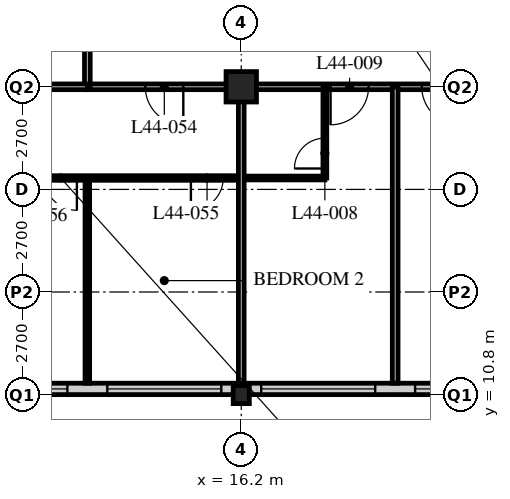
"""IFC4 building model, lengths in metres.
Left out: names, types, materials, properties, quantities, classifications, styles, units other than length and angle.
Written with IfcOpenShell. Run it as: python <this file> out.ifc"""

import sys

from ifc_helpers import new_model, si_unit, direction, frame, frame_2d, origin, origin_2d, place, context, subcontext, project, spatial, rectangle, hollow_rectangle, i_section, extrude, element, fill, save


model = new_model("IFC4")
c1 = context("Model", 3, precision=1e-05, world=origin(), true_north=direction((0.0, 1.0)))
c2 = subcontext(c1, "Body", "Model", "MODEL_VIEW")
j1 = project(units=[si_unit("LENGTHUNIT", "METRE"), si_unit("PLANEANGLEUNIT", "RADIAN")], contexts=[c1])
p1 = place(None, origin())
s1 = spatial("IfcSite", under=j1, at=p1, CompositionType="ELEMENT")
p2 = place(p1, origin())
s2 = spatial("IfcBuilding", under=s1, at=p2, CompositionType="ELEMENT")
p3 = place(p2, frame((0.0, 0.0, 174.0)))
s3 = spatial("IfcBuildingStorey", under=s2, at=p3, CompositionType="ELEMENT", Elevation=174.0)
p4 = place(p3, frame((16.2, 10.8, 0.0), z_axis=(0.0, 0.0, 1.0), x_axis=(1.0, 0.0, 0.0)))
e1 = element("IfcColumn", 1, at=p4, inside=s3, PredefinedType="COLUMN", context=c2, shape_type="SweptSolid", body=[
    extrude(i_section(OverallWidth=0.424, OverallDepth=0.475, WebThickness=0.048, FlangeThickness=0.077, FilletRadius=0.015, at=origin_2d()), origin(), (0.0, 0.0, 1.0), 3.6),
])
p5 = place(p3, frame((16.2, 18.9, 0.0), z_axis=(0.0, 0.0, 1.0), x_axis=(1.0, 0.0, 0.0)))
e2 = element("IfcColumn", 2, at=p5, inside=s3, PredefinedType="COLUMN", context=c2, shape_type="SweptSolid", body=[
    extrude(hollow_rectangle(XDim=0.8, YDim=0.8, WallThickness=0.08, at=origin_2d()), origin(), (0.0, 0.0, 1.0), 3.6),
])
p6 = place(p3, frame((8.4, 10.95, 0.0), z_axis=(0.0, 0.0, 1.0), x_axis=(1.0, 0.0, 0.0)))
e3 = element("IfcWall", 3, at=p6, inside=s3, PredefinedType="SOLIDWALL", context=c2, shape_type="SweptSolid", body=[
    extrude(rectangle(XDim=40.2, YDim=0.3, at=frame_2d((20.1, 0.0))), origin(), (0.0, 0.0, 1.0), 3.39),
])
p7 = place(p6, frame((0.225, 0.0, 0.6)))
e4 = element("IfcOpeningElement", 4, at=p7, cuts=e3, PredefinedType="OPENING", context=c2, shape_type="SweptSolid", body=[
    extrude(rectangle(XDim=3.0, YDim=2.4, at=frame_2d((1.5, 1.2))), frame((0.0, 0.16, 0.0), z_axis=(0.0, -1.0, 0.0), x_axis=(1.0, 0.0, 0.0)), (0.0, 0.0, 1.0), 0.32),
])
p8 = place(p6, frame((4.275, 0.0, 0.6)))
e5 = element("IfcOpeningElement", 5, at=p8, cuts=e3, PredefinedType="OPENING", context=c2, shape_type="SweptSolid", body=[
    extrude(rectangle(XDim=3.0, YDim=2.4, at=frame_2d((1.5, 1.2))), frame((0.0, 0.16, 0.0), z_axis=(0.0, -1.0, 0.0), x_axis=(1.0, 0.0, 0.0)), (0.0, 0.0, 1.0), 0.32),
])
p9 = place(p6, frame((8.325, 0.0, 0.6)))
e6 = element("IfcOpeningElement", 6, at=p9, cuts=e3, PredefinedType="OPENING", context=c2, shape_type="SweptSolid", body=[
    extrude(rectangle(XDim=3.0, YDim=2.4, at=frame_2d((1.5, 1.2))), frame((0.0, 0.16, 0.0), z_axis=(0.0, -1.0, 0.0), x_axis=(1.0, 0.0, 0.0)), (0.0, 0.0, 1.0), 0.32),
])
p10 = place(p6, frame((12.375, 0.0, 0.6)))
e7 = element("IfcOpeningElement", 7, at=p10, cuts=e3, PredefinedType="OPENING", context=c2, shape_type="SweptSolid", body=[
    extrude(rectangle(XDim=3.0, YDim=2.4, at=frame_2d((1.5, 1.2))), frame((0.0, 0.16, 0.0), z_axis=(0.0, -1.0, 0.0), x_axis=(1.0, 0.0, 0.0)), (0.0, 0.0, 1.0), 0.32),
])
p11 = place(p6, frame((16.425, 0.0, 0.6)))
e8 = element("IfcOpeningElement", 8, at=p11, cuts=e3, PredefinedType="OPENING", context=c2, shape_type="SweptSolid", body=[
    extrude(rectangle(XDim=3.0, YDim=2.4, at=frame_2d((1.5, 1.2))), frame((0.0, 0.16, 0.0), z_axis=(0.0, -1.0, 0.0), x_axis=(1.0, 0.0, 0.0)), (0.0, 0.0, 1.0), 0.32),
])
p12 = place(p6, frame((20.475, 0.0, 0.6)))
e9 = element("IfcOpeningElement", 9, at=p12, cuts=e3, PredefinedType="OPENING", context=c2, shape_type="SweptSolid", body=[
    extrude(rectangle(XDim=3.0, YDim=2.4, at=frame_2d((1.5, 1.2))), frame((0.0, 0.16, 0.0), z_axis=(0.0, -1.0, 0.0), x_axis=(1.0, 0.0, 0.0)), (0.0, 0.0, 1.0), 0.32),
])
p13 = place(p6, frame((24.525, 0.0, 0.6)))
e10 = element("IfcOpeningElement", 10, at=p13, cuts=e3, PredefinedType="OPENING", context=c2, shape_type="SweptSolid", body=[
    extrude(rectangle(XDim=3.0, YDim=2.4, at=frame_2d((1.5, 1.2))), frame((0.0, 0.16, 0.0), z_axis=(0.0, -1.0, 0.0), x_axis=(1.0, 0.0, 0.0)), (0.0, 0.0, 1.0), 0.32),
])
p14 = place(p6, frame((28.575, 0.0, 0.6)))
e11 = element("IfcOpeningElement", 11, at=p14, cuts=e3, PredefinedType="OPENING", context=c2, shape_type="SweptSolid", body=[
    extrude(rectangle(XDim=3.0, YDim=2.4, at=frame_2d((1.5, 1.2))), frame((0.0, 0.16, 0.0), z_axis=(0.0, -1.0, 0.0), x_axis=(1.0, 0.0, 0.0)), (0.0, 0.0, 1.0), 0.32),
])
p15 = place(p6, frame((32.625, 0.0, 0.6)))
e12 = element("IfcOpeningElement", 12, at=p15, cuts=e3, PredefinedType="OPENING", context=c2, shape_type="SweptSolid", body=[
    extrude(rectangle(XDim=3.0, YDim=2.4, at=frame_2d((1.5, 1.2))), frame((0.0, 0.16, 0.0), z_axis=(0.0, -1.0, 0.0), x_axis=(1.0, 0.0, 0.0)), (0.0, 0.0, 1.0), 0.32),
])
p16 = place(p6, frame((36.675, 0.0, 0.6)))
e13 = element("IfcOpeningElement", 13, at=p16, cuts=e3, PredefinedType="OPENING", context=c2, shape_type="SweptSolid", body=[
    extrude(rectangle(XDim=3.0, YDim=2.4, at=frame_2d((1.5, 1.2))), frame((0.0, 0.16, 0.0), z_axis=(0.0, -1.0, 0.0), x_axis=(1.0, 0.0, 0.0)), (0.0, 0.0, 1.0), 0.32),
])
p17 = place(p3, frame((12.15, 18.9, 0.0), z_axis=(0.0, 0.0, 1.0), x_axis=(1.0, 0.0, 0.0)))
e14 = element("IfcWall", 14, at=p17, inside=s3, PredefinedType="PARTITIONING", context=c2, shape_type="SweptSolid", body=[
    extrude(rectangle(XDim=32.4, YDim=0.15, at=frame_2d((16.2, 0.0))), origin(), (0.0, 0.0, 1.0), 2.778),
])
p18 = place(p17, frame((6.4, 0.0, 0.0)))
e15 = element("IfcOpeningElement", 15, at=p18, cuts=e14, PredefinedType="OPENING", context=c2, shape_type="SweptSolid", body=[
    extrude(rectangle(XDim=1.0, YDim=2.1, at=frame_2d((0.5, 1.05))), frame((0.0, 0.085, 0.0), z_axis=(0.0, -1.0, 0.0), x_axis=(1.0, 0.0, 0.0)), (0.0, 0.0, 1.0), 0.17),
])
p19 = place(p17, frame((8.8, 0.0, 0.0)))
e16 = element("IfcOpeningElement", 16, at=p19, cuts=e14, PredefinedType="OPENING", context=c2, shape_type="SweptSolid", body=[
    extrude(rectangle(XDim=1.0, YDim=2.1, at=frame_2d((0.5, 1.05))), frame((0.0, 0.085, 0.0), z_axis=(0.0, -1.0, 0.0), x_axis=(1.0, 0.0, 0.0)), (0.0, 0.0, 1.0), 0.17),
])
p20 = place(p17, frame((13.05, 0.0, 0.0)))
e17 = element("IfcOpeningElement", 17, at=p20, cuts=e14, PredefinedType="OPENING", context=c2, shape_type="SweptSolid", body=[
    extrude(rectangle(XDim=1.0, YDim=2.1, at=frame_2d((0.5, 1.05))), frame((0.0, 0.085, 0.0), z_axis=(0.0, -1.0, 0.0), x_axis=(1.0, 0.0, 0.0)), (0.0, 0.0, 1.0), 0.17),
])
p21 = place(p17, frame((22.6, 0.0, 0.0)))
e18 = element("IfcOpeningElement", 18, at=p21, cuts=e14, PredefinedType="OPENING", context=c2, shape_type="SweptSolid", body=[
    extrude(rectangle(XDim=1.0, YDim=2.1, at=frame_2d((0.5, 1.05))), frame((0.0, 0.085, 0.0), z_axis=(0.0, -1.0, 0.0), x_axis=(1.0, 0.0, 0.0)), (0.0, 0.0, 1.0), 0.17),
])
p22 = place(p17, frame((25.0, 0.0, 0.0)))
e19 = element("IfcOpeningElement", 19, at=p22, cuts=e14, PredefinedType="OPENING", context=c2, shape_type="SweptSolid", body=[
    extrude(rectangle(XDim=1.0, YDim=2.1, at=frame_2d((0.5, 1.05))), frame((0.0, 0.085, 0.0), z_axis=(0.0, -1.0, 0.0), x_axis=(1.0, 0.0, 0.0)), (0.0, 0.0, 1.0), 0.17),
])
p23 = place(p17, frame((1.525, 0.0, 0.0)))
e20 = element("IfcOpeningElement", 20, at=p23, cuts=e14, PredefinedType="OPENING", context=c2, shape_type="SweptSolid", body=[
    extrude(rectangle(XDim=1.0, YDim=2.1, at=frame_2d((0.5, 1.05))), frame((0.0, 0.085, 0.0), z_axis=(0.0, -1.0, 0.0), x_axis=(1.0, 0.0, 0.0)), (0.0, 0.0, 1.0), 0.17),
])
p24 = place(p17, frame((29.875, 0.0, 0.0)))
e21 = element("IfcOpeningElement", 21, at=p24, cuts=e14, PredefinedType="OPENING", context=c2, shape_type="SweptSolid", body=[
    extrude(rectangle(XDim=1.0, YDim=2.1, at=frame_2d((0.5, 1.05))), frame((0.0, 0.085, 0.0), z_axis=(0.0, -1.0, 0.0), x_axis=(1.0, 0.0, 0.0)), (0.0, 0.0, 1.0), 0.17),
])
p25 = place(p3, frame((12.15, 18.9, 0.0), z_axis=(0.0, 0.0, 1.0), x_axis=(0.0, 1.0, 0.0)))
e22 = element("IfcWall", 22, at=p25, inside=s3, PredefinedType="PARTITIONING", context=c2, shape_type="SweptSolid", body=[
    extrude(rectangle(XDim=24.3, YDim=0.15, at=frame_2d((12.15, 0.0))), origin(), (0.0, 0.0, 1.0), 3.39),
])
p26 = place(p25, frame((2.35, 0.0, 0.0)))
e23 = element("IfcOpeningElement", 23, at=p26, cuts=e22, PredefinedType="OPENING", context=c2, shape_type="SweptSolid", body=[
    extrude(rectangle(XDim=1.0, YDim=2.1, at=frame_2d((0.5, 1.05))), frame((0.0, 0.085, 0.0), z_axis=(0.0, -1.0, 0.0), x_axis=(1.0, 0.0, 0.0)), (0.0, 0.0, 1.0), 0.17),
])
p27 = place(p25, frame((6.4, 0.0, 0.0)))
e24 = element("IfcOpeningElement", 24, at=p27, cuts=e22, PredefinedType="OPENING", context=c2, shape_type="SweptSolid", body=[
    extrude(rectangle(XDim=1.0, YDim=2.1, at=frame_2d((0.5, 1.05))), frame((0.0, 0.085, 0.0), z_axis=(0.0, -1.0, 0.0), x_axis=(1.0, 0.0, 0.0)), (0.0, 0.0, 1.0), 0.17),
])
p28 = place(p25, frame((8.5, 0.0, 0.0)))
e25 = element("IfcOpeningElement", 25, at=p28, cuts=e22, PredefinedType="OPENING", context=c2, shape_type="SweptSolid", body=[
    extrude(rectangle(XDim=1.0, YDim=2.1, at=frame_2d((0.5, 1.05))), frame((0.0, 0.085, 0.0), z_axis=(0.0, -1.0, 0.0), x_axis=(1.0, 0.0, 0.0)), (0.0, 0.0, 1.0), 0.17),
])
p29 = place(p25, frame((16.6, 0.0, 0.0)))
e26 = element("IfcOpeningElement", 26, at=p29, cuts=e22, PredefinedType="OPENING", context=c2, shape_type="SweptSolid", body=[
    extrude(rectangle(XDim=1.0, YDim=2.1, at=frame_2d((0.5, 1.05))), frame((0.0, 0.085, 0.0), z_axis=(0.0, -1.0, 0.0), x_axis=(1.0, 0.0, 0.0)), (0.0, 0.0, 1.0), 0.17),
])
p30 = place(p3, frame((16.2, 16.5, 0.0), z_axis=(0.0, 0.0, 1.0), x_axis=(1.0, 0.0, 0.0)))
e27 = element("IfcWall", 27, at=p30, inside=s3, PredefinedType="PARTITIONING", context=c2, shape_type="SweptSolid", body=[
    extrude(rectangle(XDim=2.2, YDim=0.1, at=frame_2d((1.1, 0.0))), origin(), (0.0, 0.0, 1.0), 3.39),
])
p31 = place(p3, frame((18.4, 18.9, 0.0), z_axis=(0.0, 0.0, 1.0), x_axis=(0.0, -1.0, 0.0)))
e28 = element("IfcWall", 28, at=p31, inside=s3, PredefinedType="PARTITIONING", context=c2, shape_type="SweptSolid", body=[
    extrude(rectangle(XDim=2.4, YDim=0.1, at=frame_2d((1.2, 0.0))), origin(), (0.0, 0.0, 1.0), 3.39),
])
p32 = place(p31, frame((1.35, 0.0, 0.0)))
e29 = element("IfcOpeningElement", 29, at=p32, cuts=e28, PredefinedType="OPENING", context=c2, shape_type="SweptSolid", body=[
    extrude(rectangle(XDim=0.8, YDim=2.1, at=frame_2d((0.4, 1.05))), frame((0.0, 0.06, 0.0), z_axis=(0.0, -1.0, 0.0), x_axis=(1.0, 0.0, 0.0)), (0.0, 0.0, 1.0), 0.12),
])
p33 = place(p3, frame((20.25, 18.9, 0.0), z_axis=(0.0, 0.0, 1.0), x_axis=(0.0, -1.0, 0.0)))
e30 = element("IfcWall", 30, at=p33, inside=s3, PredefinedType="PARTITIONING", context=c2, shape_type="SweptSolid", body=[
    extrude(rectangle(XDim=7.8, YDim=0.15, at=frame_2d((3.9, 0.0))), origin(), (0.0, 0.0, 1.0), 3.39),
])
p34 = place(p3, frame((8.15, 16.5, 0.0), z_axis=(0.0, 0.0, 1.0), x_axis=(1.0, 0.0, 0.0)))
e31 = element("IfcWall", 31, at=p34, inside=s3, PredefinedType="PARTITIONING", context=c2, shape_type="SweptSolid", body=[
    extrude(rectangle(XDim=8.05, YDim=0.12, at=frame_2d((4.025, 0.0))), origin(), (0.0, 0.0, 1.0), 3.39),
])
p35 = place(p34, frame((6.725, 0.0, 0.0)))
e32 = element("IfcOpeningElement", 32, at=p35, cuts=e31, PredefinedType="OPENING", context=c2, shape_type="SweptSolid", body=[
    extrude(rectangle(XDim=0.85, YDim=2.1, at=frame_2d((0.425, 1.05))), frame((0.0, 0.07, 0.0), z_axis=(0.0, -1.0, 0.0), x_axis=(1.0, 0.0, 0.0)), (0.0, 0.0, 1.0), 0.14),
])
p36 = place(p34, frame((2.875, 0.0, 0.0)))
e33 = element("IfcOpeningElement", 33, at=p36, cuts=e31, PredefinedType="OPENING", context=c2, shape_type="SweptSolid", body=[
    extrude(rectangle(XDim=0.85, YDim=2.1, at=frame_2d((0.425, 1.05))), frame((0.0, 0.07, 0.0), z_axis=(0.0, -1.0, 0.0), x_axis=(1.0, 0.0, 0.0)), (0.0, 0.0, 1.0), 0.14),
])
p37 = place(p3, frame((12.15, 16.5, 0.0), z_axis=(0.0, 0.0, 1.0), x_axis=(0.0, -1.0, 0.0)))
e34 = element("IfcWall", 34, at=p37, inside=s3, PredefinedType="PARTITIONING", context=c2, shape_type="SweptSolid", body=[
    extrude(rectangle(XDim=5.4, YDim=0.12, at=frame_2d((2.7, 0.0))), origin(), (0.0, 0.0, 1.0), 3.39),
])
for number, where, z_axis, x_axis in (
    (35, (4.35, 18.9, 0.0), (0.0, 0.0, 1.0), (1.0, 0.0, 0.0)),
    (36, (16.2, 18.9, 0.0), (0.0, 0.0, 1.0), (0.0, -1.0, 0.0)),
):
    element("IfcWall", number, at=place(p3, frame(where, z_axis=z_axis, x_axis=x_axis)), inside=s3, PredefinedType="PARTITIONING", context=c2, shape_type="SweptSolid", body=[
        extrude(rectangle(XDim=7.8, YDim=0.15, at=frame_2d((3.9, 0.0))), origin(), (0.0, 0.0, 1.0), 2.778),
    ])
p38 = place(p7, origin())
e37 = element("IfcWindow", 37, at=p38, inside=s3, PartitioningType="SINGLE_PANEL", PredefinedType="WINDOW", context=c2, shape_type="SweptSolid", body=[
    extrude(rectangle(XDim=3.0, YDim=2.4, at=frame_2d((1.5, 1.2))), frame((0.0, 0.03, 0.0), z_axis=(0.0, -1.0, 0.0), x_axis=(1.0, 0.0, 0.0)), (0.0, 0.0, 1.0), 0.06),
])
fill(e4, e37)
p39 = place(p8, origin())
e38 = element("IfcWindow", 38, at=p39, inside=s3, PartitioningType="SINGLE_PANEL", PredefinedType="WINDOW", context=c2, shape_type="SweptSolid", body=[
    extrude(rectangle(XDim=3.0, YDim=2.4, at=frame_2d((1.5, 1.2))), frame((0.0, 0.03, 0.0), z_axis=(0.0, -1.0, 0.0), x_axis=(1.0, 0.0, 0.0)), (0.0, 0.0, 1.0), 0.06),
])
fill(e5, e38)
p40 = place(p9, origin())
e39 = element("IfcWindow", 39, at=p40, inside=s3, PartitioningType="SINGLE_PANEL", PredefinedType="WINDOW", context=c2, shape_type="SweptSolid", body=[
    extrude(rectangle(XDim=3.0, YDim=2.4, at=frame_2d((1.5, 1.2))), frame((0.0, 0.03, 0.0), z_axis=(0.0, -1.0, 0.0), x_axis=(1.0, 0.0, 0.0)), (0.0, 0.0, 1.0), 0.06),
])
fill(e6, e39)
p41 = place(p10, origin())
e40 = element("IfcWindow", 40, at=p41, inside=s3, PartitioningType="SINGLE_PANEL", PredefinedType="WINDOW", context=c2, shape_type="SweptSolid", body=[
    extrude(rectangle(XDim=3.0, YDim=2.4, at=frame_2d((1.5, 1.2))), frame((0.0, 0.03, 0.0), z_axis=(0.0, -1.0, 0.0), x_axis=(1.0, 0.0, 0.0)), (0.0, 0.0, 1.0), 0.06),
])
fill(e7, e40)
p42 = place(p32, origin())
e41 = element("IfcDoor", 41, at=p42, inside=s3, OperationType="SINGLE_SWING_LEFT", PredefinedType="DOOR", context=c2, shape_type="SweptSolid", body=[
    extrude(rectangle(XDim=0.8, YDim=2.1, at=frame_2d((0.4, 1.05))), frame((0.0, 0.025, 0.0), z_axis=(0.0, -1.0, 0.0), x_axis=(1.0, 0.0, 0.0)), (0.0, 0.0, 1.0), 0.05),
])
fill(e29, e41)
p43 = place(p18, origin())
e42 = element("IfcDoor", 42, at=p43, inside=s3, OperationType="SINGLE_SWING_RIGHT", PredefinedType="DOOR", context=c2, shape_type="SweptSolid", body=[
    extrude(rectangle(XDim=1.0, YDim=2.1, at=frame_2d((0.5, 1.05))), frame((0.0, 0.025, 0.0), z_axis=(0.0, -1.0, 0.0), x_axis=(1.0, 0.0, 0.0)), (0.0, 0.0, 1.0), 0.05),
])
fill(e15, e42)
p44 = place(p19, origin())
e43 = element("IfcDoor", 43, at=p44, inside=s3, OperationType="SINGLE_SWING_LEFT", PredefinedType="DOOR", context=c2, shape_type="SweptSolid", body=[
    extrude(rectangle(XDim=1.0, YDim=2.1, at=frame_2d((0.5, 1.05))), frame((0.0, 0.025, 0.0), z_axis=(0.0, -1.0, 0.0), x_axis=(1.0, 0.0, 0.0)), (0.0, 0.0, 1.0), 0.05),
])
fill(e16, e43)
p45 = place(p23, origin())
e44 = element("IfcDoor", 44, at=p45, inside=s3, OperationType="SINGLE_SWING_LEFT", PredefinedType="DOOR", context=c2, shape_type="SweptSolid", body=[
    extrude(rectangle(XDim=1.0, YDim=2.1, at=frame_2d((0.5, 1.05))), frame((0.0, 0.025, 0.0), z_axis=(0.0, -1.0, 0.0), x_axis=(1.0, 0.0, 0.0)), (0.0, 0.0, 1.0), 0.05),
])
fill(e20, e44)
p46 = place(p35, origin())
e45 = element("IfcDoor", 45, at=p46, inside=s3, OperationType="SINGLE_SWING_RIGHT", PredefinedType="DOOR", context=c2, shape_type="SweptSolid", body=[
    extrude(rectangle(XDim=0.85, YDim=2.1, at=frame_2d((0.425, 1.05))), frame((0.0, 0.025, 0.0), z_axis=(0.0, -1.0, 0.0), x_axis=(1.0, 0.0, 0.0)), (0.0, 0.0, 1.0), 0.05),
])
fill(e32, e45)
p47 = place(p36, origin())
e46 = element("IfcDoor", 46, at=p47, inside=s3, OperationType="SINGLE_SWING_LEFT", PredefinedType="DOOR", context=c2, shape_type="SweptSolid", body=[
    extrude(rectangle(XDim=0.85, YDim=2.1, at=frame_2d((0.425, 1.05))), frame((0.0, 0.025, 0.0), z_axis=(0.0, -1.0, 0.0), x_axis=(1.0, 0.0, 0.0)), (0.0, 0.0, 1.0), 0.05),
])
fill(e33, e46)
save(model, sys.argv[1])
